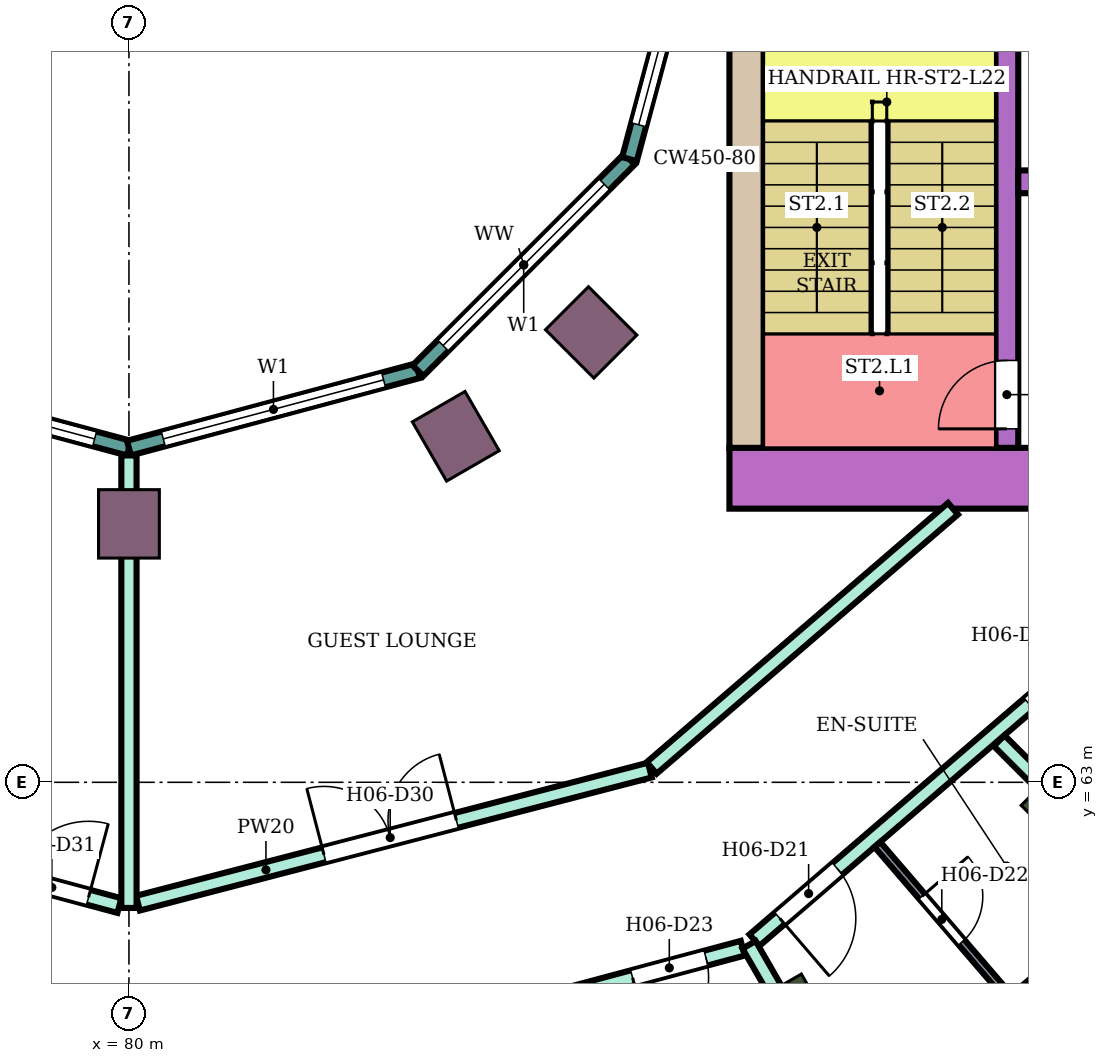
"""IFC4 building model, lengths in metres.
Left out: names, types, materials, properties, quantities, classifications, styles, units other than length and angle.
Written with IfcOpenShell. Run it as: python <this file> out.ifc"""

import sys

from ifc_helpers import new_model, si_unit, direction, frame, frame_2d, origin, origin_2d, place, context, subcontext, project, spatial, rectangle, extrude, element, fill, save


model = new_model("IFC4")
c1 = context("Model", 3, precision=1e-05, world=origin(), true_north=direction((0.0, 1.0)))
c2 = subcontext(c1, "Body", "Model", "MODEL_VIEW")
j1 = project(units=[si_unit("LENGTHUNIT", "METRE"), si_unit("PLANEANGLEUNIT", "RADIAN")], contexts=[c1])
p1 = place(None, origin())
s1 = spatial("IfcSite", under=j1, at=p1, CompositionType="ELEMENT")
p2 = place(p1, origin())
s2 = spatial("IfcBuilding", under=s1, at=p2, CompositionType="ELEMENT")
p3 = place(p2, frame((0.0, 0.0, 97.6)))
s3 = spatial("IfcBuildingStorey", under=s2, at=p3, CompositionType="ELEMENT", Elevation=97.6)
for number, where, z_axis, x_axis in (
    (1, (88.8, 59.758, 0.0), (0.0, 0.0, 1.0), (0.5, -0.866, 0.0)),
    (2, (92.445, 62.555, 0.0), (0.0, 0.0, 1.0), (0.707, -0.707, 0.0)),
):
    element("IfcColumn", number, at=place(p3, frame(where, z_axis=z_axis, x_axis=x_axis)), inside=s3, PredefinedType="COLUMN", context=c2, shape_type="SweptSolid", body=[
        extrude(rectangle(XDim=1.2, YDim=0.8, at=origin_2d()), origin(), (0.0, 0.0, 1.0), 3.8),
    ])
for number, where, z_axis, x_axis in (
    (3, (80.0, 66.4, 0.0), (0.0, 0.0, 1.0), (0.0, -1.0, 0.0)),
    (4, (84.3, 67.552, 0.0), (0.0, 0.0, 1.0), (0.5, -0.866, 0.0)),
    (5, (86.081, 68.919, 0.0), (0.0, 0.0, 1.0), (0.707, -0.707, 0.0)),
):
    element("IfcColumn", number, at=place(p3, frame(where, z_axis=z_axis, x_axis=x_axis)), inside=s3, PredefinedType="COLUMN", context=c2, shape_type="SweptSolid", body=[
        extrude(rectangle(XDim=0.9, YDim=0.8, at=origin_2d()), origin(), (0.0, 0.0, 1.0), 3.8),
    ])
p4 = place(p3, frame((87.9, 67.0, 0.0), z_axis=(0.0, 0.0, 1.0), x_axis=(1.0, 0.0, 0.0)))
e6 = element("IfcWall", 6, at=p4, inside=s3, PredefinedType="SHEAR", context=c2, shape_type="SweptSolid", body=[
    extrude(rectangle(XDim=14.7, YDim=0.8, at=frame_2d((7.35, 0.0))), origin(), (0.0, 0.0, 1.0), 3.48),
])
p5 = place(p4, frame((4.2, 0.0, 0.0)))
e7 = element("IfcOpeningElement", 7, at=p5, cuts=e6, PredefinedType="OPENING", context=c2, shape_type="SweptSolid", body=[
    extrude(rectangle(XDim=2.4, YDim=2.4, at=frame_2d((1.2, 1.2))), frame((0.0, 0.41, 0.0), z_axis=(0.0, -1.0, 0.0), x_axis=(1.0, 0.0, 0.0)), (0.0, 0.0, 1.0), 0.82),
])
p6 = place(p3, frame((88.125, 67.4, 0.0), z_axis=(0.0, 0.0, 1.0), x_axis=(0.0, 1.0, 0.0)))
e8 = element("IfcWall", 8, at=p6, inside=s3, PredefinedType="SHEAR", context=c2, shape_type="SweptSolid", body=[
    extrude(rectangle(XDim=7.6, YDim=0.45, at=frame_2d((3.8, 0.0))), origin(), (0.0, 0.0, 1.0), 3.48),
])
p7 = place(p3, frame((91.55, 67.4, 0.0), z_axis=(0.0, 0.0, 1.0), x_axis=(0.0, 1.0, 0.0)))
e9 = element("IfcWall", 9, at=p7, inside=s3, PredefinedType="SHEAR", context=c2, shape_type="SweptSolid", body=[
    extrude(rectangle(XDim=7.6, YDim=0.3, at=frame_2d((3.8, 0.0))), origin(), (0.0, 0.0, 1.0), 3.48),
])
p8 = place(p7, frame((0.25, 0.0, 0.0)))
e10 = element("IfcOpeningElement", 10, at=p8, cuts=e9, PredefinedType="OPENING", context=c2, shape_type="SweptSolid", body=[
    extrude(rectangle(XDim=0.9, YDim=2.1, at=frame_2d((0.45, 1.05))), frame((0.0, 0.16, 0.0), z_axis=(0.0, -1.0, 0.0), x_axis=(1.0, 0.0, 0.0)), (0.0, 0.0, 1.0), 0.32),
])
p9 = place(p3, frame((91.7, 70.9, 0.0), z_axis=(0.0, 0.0, 1.0), x_axis=(1.0, 0.0, 0.0)))
e11 = element("IfcWall", 11, at=p9, inside=s3, PredefinedType="SHEAR", context=c2, shape_type="SweptSolid", body=[
    extrude(rectangle(XDim=10.9, YDim=0.3, at=frame_2d((5.45, 0.0))), origin(), (0.0, 0.0, 1.0), 3.48),
])
p10 = place(p9, frame((0.4, 0.0, 0.0)))
e12 = element("IfcOpeningElement", 12, at=p10, cuts=e11, PredefinedType="OPENING", context=c2, shape_type="SweptSolid", body=[
    extrude(rectangle(XDim=1.4, YDim=2.1, at=frame_2d((0.7, 1.05))), frame((0.0, 0.16, 0.0), z_axis=(0.0, -1.0, 0.0), x_axis=(1.0, 0.0, 0.0)), (0.0, 0.0, 1.0), 0.32),
])
p11 = place(p9, frame((5.4, 0.0, 0.0)))
e13 = element("IfcOpeningElement", 13, at=p11, cuts=e11, PredefinedType="OPENING", context=c2, shape_type="SweptSolid", body=[
    extrude(rectangle(XDim=1.4, YDim=2.1, at=frame_2d((0.7, 1.05))), frame((0.0, 0.16, 0.0), z_axis=(0.0, -1.0, 0.0), x_axis=(1.0, 0.0, 0.0)), (0.0, 0.0, 1.0), 0.32),
])
p12 = place(p9, frame((8.1, 0.0, 0.0)))
e14 = element("IfcOpeningElement", 14, at=p12, cuts=e11, PredefinedType="OPENING", context=c2, shape_type="SweptSolid", body=[
    extrude(rectangle(XDim=1.0, YDim=2.1, at=frame_2d((0.5, 1.05))), frame((0.0, 0.16, 0.0), z_axis=(0.0, -1.0, 0.0), x_axis=(1.0, 0.0, 0.0)), (0.0, 0.0, 1.0), 0.32),
])
p13 = place(p3, frame((76.198, 68.415, 0.0), z_axis=(0.0, 0.0, 1.0), x_axis=(0.965933654434, -0.258789828301, 0.0)))
e15 = element("IfcWall", 15, at=p13, inside=s3, PredefinedType="NOTDEFINED", context=c2, shape_type="SweptSolid", body=[
    extrude(rectangle(XDim=3.936, YDim=0.2, at=frame_2d((1.968, 0.0))), origin(), (0.0, 0.0, 1.0), 3.8),
])
p14 = place(p13, frame((0.468, 0.0, 0.9)))
e16 = element("IfcOpeningElement", 16, at=p14, cuts=e15, PredefinedType="OPENING", context=c2, shape_type="SweptSolid", body=[
    extrude(rectangle(XDim=3.0, YDim=2.3, at=frame_2d((1.5, 1.15))), frame((0.0, 0.11, 0.0), z_axis=(0.0, -1.0, 0.0), x_axis=(1.0, 0.0, 0.0)), (0.0, 0.0, 1.0), 0.22),
])
p15 = place(p3, frame((80.0, 67.396, 0.0), z_axis=(0.0, 0.0, 1.0), x_axis=(0.965933654434, 0.258789828301, 0.0)))
e17 = element("IfcWall", 17, at=p15, inside=s3, PredefinedType="NOTDEFINED", context=c2, shape_type="SweptSolid", body=[
    extrude(rectangle(XDim=3.936, YDim=0.2, at=frame_2d((1.968, 0.0))), origin(), (0.0, 0.0, 1.0), 3.8),
])
p16 = place(p15, frame((0.468, 0.0, 0.9)))
e18 = element("IfcOpeningElement", 18, at=p16, cuts=e17, PredefinedType="OPENING", context=c2, shape_type="SweptSolid", body=[
    extrude(rectangle(XDim=3.0, YDim=2.3, at=frame_2d((1.5, 1.15))), frame((0.0, 0.11, 0.0), z_axis=(0.0, -1.0, 0.0), x_axis=(1.0, 0.0, 0.0)), (0.0, 0.0, 1.0), 0.22),
])
p17 = place(p3, frame((83.802, 68.415, 0.0), z_axis=(0.0, 0.0, 1.0), x_axis=(0.707106781187, 0.707106781187, 0.0)))
e19 = element("IfcWall", 19, at=p17, inside=s3, PredefinedType="NOTDEFINED", context=c2, shape_type="SweptSolid", body=[
    extrude(rectangle(XDim=3.936, YDim=0.2, at=frame_2d((1.968, 0.0))), origin(), (0.0, 0.0, 1.0), 3.8),
])
p18 = place(p17, frame((0.468, 0.0, 0.9)))
e20 = element("IfcOpeningElement", 20, at=p18, cuts=e19, PredefinedType="OPENING", context=c2, shape_type="SweptSolid", body=[
    extrude(rectangle(XDim=3.0, YDim=2.3, at=frame_2d((1.5, 1.15))), frame((0.0, 0.11, 0.0), z_axis=(0.0, -1.0, 0.0), x_axis=(1.0, 0.0, 0.0)), (0.0, 0.0, 1.0), 0.22),
])
p19 = place(p3, frame((86.585, 71.198, 0.0), z_axis=(0.0, 0.0, 1.0), x_axis=(0.258789828301, 0.965933654434, 0.0)))
e21 = element("IfcWall", 21, at=p19, inside=s3, PredefinedType="NOTDEFINED", context=c2, shape_type="SweptSolid", body=[
    extrude(rectangle(XDim=3.936, YDim=0.2, at=frame_2d((1.968, 0.0))), origin(), (0.0, 0.0, 1.0), 3.8),
])
p20 = place(p19, frame((0.468, 0.0, 0.9)))
e22 = element("IfcOpeningElement", 22, at=p20, cuts=e21, PredefinedType="OPENING", context=c2, shape_type="SweptSolid", body=[
    extrude(rectangle(XDim=3.0, YDim=2.3, at=frame_2d((1.5, 1.15))), frame((0.0, 0.11, 0.0), z_axis=(0.0, -1.0, 0.0), x_axis=(1.0, 0.0, 0.0)), (0.0, 0.0, 1.0), 0.22),
])
p21 = place(p3, frame((71.877, 60.831, 0.0), z_axis=(0.0, 0.0, 1.0), x_axis=(0.965905026676, -0.258896657842, 0.0)))
e23 = element("IfcWall", 23, at=p21, inside=s3, PredefinedType="PARTITIONING", context=c2, shape_type="SweptSolid", body=[
    extrude(rectangle(XDim=8.36, YDim=0.2, at=frame_2d((4.18, 0.0))), origin(), (0.0, 0.0, 1.0), 3.35),
])
p22 = place(p21, frame((4.655, 0.0, 0.0)))
e24 = element("IfcOpeningElement", 24, at=p22, cuts=e23, PredefinedType="OPENING", context=c2, shape_type="SweptSolid", body=[
    extrude(rectangle(XDim=1.8, YDim=2.1, at=frame_2d((0.9, 1.05))), frame((0.0, 0.11, 0.0), z_axis=(0.0, -1.0, 0.0), x_axis=(1.0, 0.0, 0.0)), (0.0, 0.0, 1.0), 0.22),
])
p23 = place(p3, frame((73.297, 63.143, 0.0), z_axis=(0.0, 0.0, 1.0), x_axis=(0.965859030528, -0.25906820173, 0.0)))
e25 = element("IfcWall", 25, at=p23, inside=s3, PredefinedType="PARTITIONING", context=c2, shape_type="SweptSolid", body=[
    extrude(rectangle(XDim=6.81, YDim=0.2, at=frame_2d((3.405, 0.0))), origin(), (0.0, 0.0, 1.0), 3.35),
])
p24 = place(p23, frame((5.39, 0.0, 0.0)))
e26 = element("IfcOpeningElement", 26, at=p24, cuts=e25, PredefinedType="OPENING", context=c2, shape_type="SweptSolid", body=[
    extrude(rectangle(XDim=1.0, YDim=2.1, at=frame_2d((0.5, 1.05))), frame((0.0, 0.11, 0.0), z_axis=(0.0, -1.0, 0.0), x_axis=(1.0, 0.0, 0.0)), (0.0, 0.0, 1.0), 0.22),
])
p25 = place(p3, frame((80.119, 61.41, 0.0), z_axis=(0.0, 0.0, 1.0), x_axis=(0.967823361235, 0.251630565408, 0.0)))
e27 = element("IfcWall", 27, at=p25, inside=s3, PredefinedType="PARTITIONING", context=c2, shape_type="SweptSolid", body=[
    extrude(rectangle(XDim=6.958, YDim=0.2, at=frame_2d((3.479, 0.0))), origin(), (0.0, 0.0, 1.0), 3.35),
])
p26 = place(p25, frame((2.529, 0.0, 0.0)))
e28 = element("IfcOpeningElement", 28, at=p26, cuts=e27, PredefinedType="OPENING", context=c2, shape_type="SweptSolid", body=[
    extrude(rectangle(XDim=1.8, YDim=2.1, at=frame_2d((0.9, 1.05))), frame((0.0, 0.11, 0.0), z_axis=(0.0, -1.0, 0.0), x_axis=(1.0, 0.0, 0.0)), (0.0, 0.0, 1.0), 0.22),
])
p27 = place(p3, frame((80.0, 58.655, 0.0), z_axis=(0.0, 0.0, 1.0), x_axis=(0.965967338894, 0.258664068224, 0.0)))
e29 = element("IfcWall", 29, at=p27, inside=s3, PredefinedType="PARTITIONING", context=c2, shape_type="SweptSolid", body=[
    extrude(rectangle(XDim=8.36, YDim=0.2, at=frame_2d((4.18, 0.0))), origin(), (0.0, 0.0, 1.0), 3.35),
])
p28 = place(p27, frame((6.86, 0.0, 0.0)))
e30 = element("IfcOpeningElement", 30, at=p28, cuts=e29, PredefinedType="OPENING", context=c2, shape_type="SweptSolid", body=[
    extrude(rectangle(XDim=1.0, YDim=2.1, at=frame_2d((0.5, 1.05))), frame((0.0, 0.11, 0.0), z_axis=(0.0, -1.0, 0.0), x_axis=(1.0, 0.0, 0.0)), (0.0, 0.0, 1.0), 0.22),
])
p29 = place(p3, frame((80.0, 61.347, 0.0), z_axis=(0.0, 0.0, 1.0), x_axis=(0.0, 1.0, 0.0)))
e31 = element("IfcWall", 31, at=p29, inside=s3, PredefinedType="PARTITIONING", context=c2, shape_type="SweptSolid", body=[
    extrude(rectangle(XDim=5.953, YDim=0.2, at=frame_2d((2.977, 0.0))), origin(), (0.0, 0.0, 1.0), 3.35),
])
p30 = place(p3, frame((86.877, 63.189, 0.0), z_axis=(0.0, 0.0, 1.0), x_axis=(0.758088707506, 0.652151448325, 0.0)))
e32 = element("IfcWall", 32, at=p30, inside=s3, PredefinedType="PARTITIONING", context=c2, shape_type="SweptSolid", body=[
    extrude(rectangle(XDim=5.229, YDim=0.2, at=frame_2d((2.615, 0.0))), origin(), (0.0, 0.0, 1.0), 3.35),
])
p31 = place(p3, frame((88.229, 60.923, 0.0), z_axis=(0.0, 0.0, 1.0), x_axis=(0.758220952094, 0.651997690031, 0.0)))
e33 = element("IfcWall", 33, at=p31, inside=s3, PredefinedType="PARTITIONING", context=c2, shape_type="SweptSolid", body=[
    extrude(rectangle(XDim=6.346, YDim=0.2, at=frame_2d((3.173, 0.0))), origin(), (0.0, 0.0, 1.0), 3.35),
])
p32 = place(p31, frame((4.767, 0.0, 0.0)))
e34 = element("IfcOpeningElement", 34, at=p32, cuts=e33, PredefinedType="OPENING", context=c2, shape_type="SweptSolid", body=[
    extrude(rectangle(XDim=1.0, YDim=2.1, at=frame_2d((0.5, 1.05))), frame((0.0, 0.11, 0.0), z_axis=(0.0, -1.0, 0.0), x_axis=(1.0, 0.0, 0.0)), (0.0, 0.0, 1.0), 0.22),
])
p33 = place(p31, frame((0.44, 0.0, 0.0)))
e35 = element("IfcOpeningElement", 35, at=p33, cuts=e33, PredefinedType="OPENING", context=c2, shape_type="SweptSolid", body=[
    extrude(rectangle(XDim=1.0, YDim=2.1, at=frame_2d((0.5, 1.05))), frame((0.0, 0.11, 0.0), z_axis=(0.0, -1.0, 0.0), x_axis=(1.0, 0.0, 0.0)), (0.0, 0.0, 1.0), 0.22),
])
p34 = place(p3, frame((88.158, 60.862, 0.0), z_axis=(0.0, 0.0, 1.0), x_axis=(0.499916512745, -0.866073599808, 0.0)))
e36 = element("IfcWall", 36, at=p34, inside=s3, PredefinedType="PARTITIONING", context=c2, shape_type="SweptSolid", body=[
    extrude(rectangle(XDim=9.475, YDim=0.2, at=frame_2d((4.737, 0.0))), origin(), (0.0, 0.0, 1.0), 3.35),
])
p35 = place(p3, frame((91.448, 63.547, 0.0), z_axis=(0.0, 0.0, 1.0), x_axis=(0.706949958062, -0.707263569538, 0.0)))
e37 = element("IfcWall", 37, at=p35, inside=s3, PredefinedType="PARTITIONING", context=c2, shape_type="SweptSolid", body=[
    extrude(rectangle(XDim=7.006, YDim=0.2, at=frame_2d((3.503, 0.0))), origin(), (0.0, 0.0, 1.0), 3.35),
])
p36 = place(p3, frame((89.846, 62.182, 0.0), z_axis=(0.0, 0.0, 1.0), x_axis=(0.652095405055, -0.758136915541, 0.0)))
e38 = element("IfcWall", 38, at=p36, inside=s3, PredefinedType="PARTITIONING", context=c2, shape_type="SweptSolid", body=[
    extrude(rectangle(XDim=2.65, YDim=0.1, at=frame_2d((1.325, 0.0))), origin(), (0.0, 0.0, 1.0), 3.35),
])
p37 = place(p36, frame((0.9, 0.0, 0.0)))
e39 = element("IfcOpeningElement", 39, at=p37, cuts=e38, PredefinedType="OPENING", context=c2, shape_type="SweptSolid", body=[
    extrude(rectangle(XDim=0.8, YDim=2.1, at=frame_2d((0.4, 1.05))), frame((0.0, 0.06, 0.0), z_axis=(0.0, -1.0, 0.0), x_axis=(1.0, 0.0, 0.0)), (0.0, 0.0, 1.0), 0.12),
])
p38 = place(p3, frame((91.607, 60.135, 0.0), z_axis=(0.0, 0.0, 1.0), x_axis=(0.758135842672, 0.652096652388, 0.0)))
e40 = element("IfcWall", 40, at=p38, inside=s3, PredefinedType="PARTITIONING", context=c2, shape_type="SweptSolid", body=[
    extrude(rectangle(XDim=2.201, YDim=0.1, at=frame_2d((1.101, 0.0))), origin(), (0.0, 0.0, 1.0), 3.35),
])
p39 = place(p14, origin())
e41 = element("IfcWindow", 41, at=p39, inside=s3, PartitioningType="SINGLE_PANEL", PredefinedType="WINDOW", context=c2, shape_type="SweptSolid", body=[
    extrude(rectangle(XDim=3.0, YDim=2.3, at=frame_2d((1.5, 1.15))), frame((0.0, 0.03, 0.0), z_axis=(0.0, -1.0, 0.0), x_axis=(1.0, 0.0, 0.0)), (0.0, 0.0, 1.0), 0.06),
])
fill(e16, e41)
p40 = place(p16, origin())
e42 = element("IfcWindow", 42, at=p40, inside=s3, PartitioningType="SINGLE_PANEL", PredefinedType="WINDOW", context=c2, shape_type="SweptSolid", body=[
    extrude(rectangle(XDim=3.0, YDim=2.3, at=frame_2d((1.5, 1.15))), frame((0.0, 0.03, 0.0), z_axis=(0.0, -1.0, 0.0), x_axis=(1.0, 0.0, 0.0)), (0.0, 0.0, 1.0), 0.06),
])
fill(e18, e42)
p41 = place(p18, origin())
e43 = element("IfcWindow", 43, at=p41, inside=s3, PartitioningType="SINGLE_PANEL", PredefinedType="WINDOW", context=c2, shape_type="SweptSolid", body=[
    extrude(rectangle(XDim=3.0, YDim=2.3, at=frame_2d((1.5, 1.15))), frame((0.0, 0.03, 0.0), z_axis=(0.0, -1.0, 0.0), x_axis=(1.0, 0.0, 0.0)), (0.0, 0.0, 1.0), 0.06),
])
fill(e20, e43)
p42 = place(p20, origin())
e44 = element("IfcWindow", 44, at=p42, inside=s3, PartitioningType="SINGLE_PANEL", PredefinedType="WINDOW", context=c2, shape_type="SweptSolid", body=[
    extrude(rectangle(XDim=3.0, YDim=2.3, at=frame_2d((1.5, 1.15))), frame((0.0, 0.03, 0.0), z_axis=(0.0, -1.0, 0.0), x_axis=(1.0, 0.0, 0.0)), (0.0, 0.0, 1.0), 0.06),
])
fill(e22, e44)
p43 = place(p32, frame((1.0, 0.0, 0.0), z_axis=(0.0, 0.0, 1.0), x_axis=(-1.0, 0.0, 0.0)))
e45 = element("IfcDoor", 45, at=p43, inside=s3, OperationType="SINGLE_SWING_RIGHT", PredefinedType="DOOR", context=c2, shape_type="SweptSolid", body=[
    extrude(rectangle(XDim=1.0, YDim=2.1, at=frame_2d((0.5, 1.05))), frame((0.0, 0.025, 0.0), z_axis=(0.0, -1.0, 0.0), x_axis=(1.0, 0.0, 0.0)), (0.0, 0.0, 1.0), 0.05),
])
fill(e34, e45)
p44 = place(p33, frame((1.0, 0.0, 0.0), z_axis=(0.0, 0.0, 1.0), x_axis=(-1.0, 0.0, 0.0)))
e46 = element("IfcDoor", 46, at=p44, inside=s3, OperationType="SINGLE_SWING_RIGHT", PredefinedType="DOOR", context=c2, shape_type="SweptSolid", body=[
    extrude(rectangle(XDim=1.0, YDim=2.1, at=frame_2d((0.5, 1.05))), frame((0.0, 0.025, 0.0), z_axis=(0.0, -1.0, 0.0), x_axis=(1.0, 0.0, 0.0)), (0.0, 0.0, 1.0), 0.05),
])
fill(e35, e46)
p45 = place(p37, origin())
e47 = element("IfcDoor", 47, at=p45, inside=s3, OperationType="SINGLE_SWING_LEFT", PredefinedType="DOOR", context=c2, shape_type="SweptSolid", body=[
    extrude(rectangle(XDim=0.8, YDim=2.1, at=frame_2d((0.4, 1.05))), frame((0.0, 0.025, 0.0), z_axis=(0.0, -1.0, 0.0), x_axis=(1.0, 0.0, 0.0)), (0.0, 0.0, 1.0), 0.05),
])
fill(e39, e47)
p46 = place(p28, frame((1.0, 0.0, 0.0), z_axis=(0.0, 0.0, 1.0), x_axis=(-1.0, 0.0, 0.0)))
e48 = element("IfcDoor", 48, at=p46, inside=s3, OperationType="SINGLE_SWING_RIGHT", PredefinedType="DOOR", context=c2, shape_type="SweptSolid", body=[
    extrude(rectangle(XDim=1.0, YDim=2.1, at=frame_2d((0.5, 1.05))), frame((0.0, 0.025, 0.0), z_axis=(0.0, -1.0, 0.0), x_axis=(1.0, 0.0, 0.0)), (0.0, 0.0, 1.0), 0.05),
])
fill(e30, e48)
p47 = place(p26, origin())
e49 = element("IfcDoor", 49, at=p47, inside=s3, OperationType="DOUBLE_DOOR_SINGLE_SWING", PredefinedType="DOOR", context=c2, shape_type="SweptSolid", body=[
    extrude(rectangle(XDim=1.8, YDim=2.1, at=frame_2d((0.9, 1.05))), frame((0.0, 0.025, 0.0), z_axis=(0.0, -1.0, 0.0), x_axis=(1.0, 0.0, 0.0)), (0.0, 0.0, 1.0), 0.05),
])
fill(e28, e49)
p48 = place(p24, origin())
e50 = element("IfcDoor", 50, at=p48, inside=s3, OperationType="SINGLE_SWING_RIGHT", PredefinedType="DOOR", context=c2, shape_type="SweptSolid", body=[
    extrude(rectangle(XDim=1.0, YDim=2.1, at=frame_2d((0.5, 1.05))), frame((0.0, 0.025, 0.0), z_axis=(0.0, -1.0, 0.0), x_axis=(1.0, 0.0, 0.0)), (0.0, 0.0, 1.0), 0.05),
])
fill(e26, e50)
p49 = place(p8, origin())
e51 = element("IfcDoor", 51, at=p49, inside=s3, OperationType="SINGLE_SWING_LEFT", PredefinedType="DOOR", context=c2, shape_type="SweptSolid", body=[
    extrude(rectangle(XDim=0.9, YDim=2.1, at=frame_2d((0.45, 1.05))), frame((0.0, 0.025, 0.0), z_axis=(0.0, -1.0, 0.0), x_axis=(1.0, 0.0, 0.0)), (0.0, 0.0, 1.0), 0.05),
])
fill(e10, e51)
save(model, sys.argv[1])
